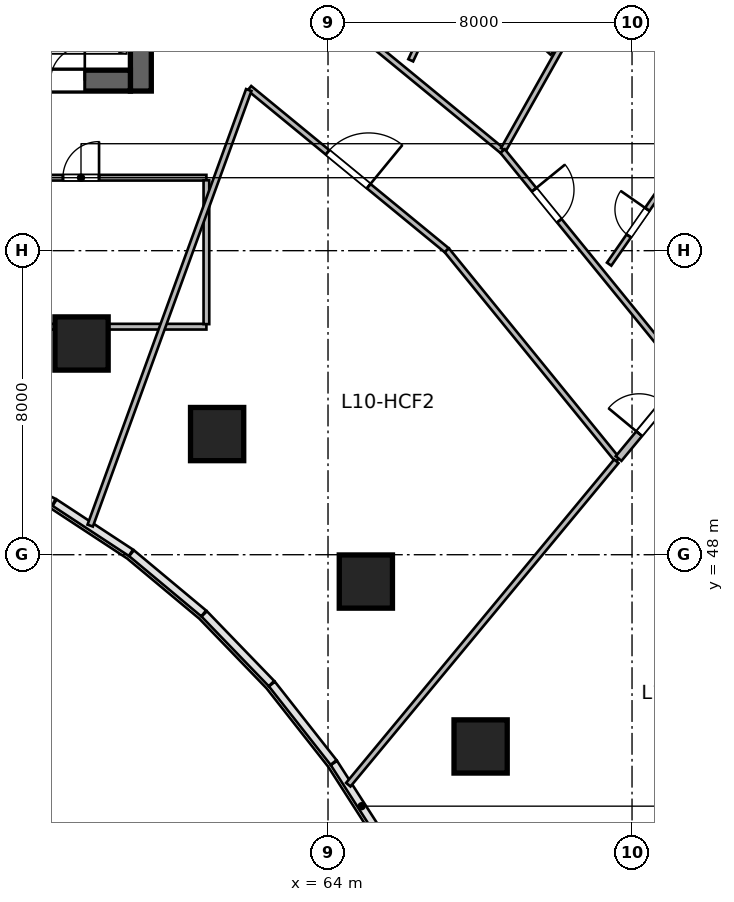
"""IFC4 building model, lengths in metres.
Left out: names, types, materials, properties, quantities, classifications, styles, units other than length and angle.
Written with IfcOpenShell. Run it as: python <this file> out.ifc"""

import sys

from ifc_helpers import new_model, si_unit, direction, frame, frame_2d, origin, origin_2d, place, context, subcontext, project, spatial, rectangle, circle, extrude, source, transform, mapped, element, fill, save


model = new_model("IFC4")
c1 = context("Model", 3, precision=1e-05, world=origin(), true_north=direction((0.0, 1.0)))
c2 = subcontext(c1, "Body", "Model", "MODEL_VIEW")
j1 = project(units=[si_unit("LENGTHUNIT", "METRE"), si_unit("PLANEANGLEUNIT", "RADIAN")], contexts=[c1])
p1 = place(None, origin())
s1 = spatial("IfcSite", under=j1, at=p1, CompositionType="ELEMENT")
p2 = place(p1, origin())
s2 = spatial("IfcBuilding", under=s1, at=p2, CompositionType="ELEMENT")
p3 = place(p2, frame((0.0, 0.0, 49.8)))
s3 = spatial("IfcBuildingStorey", under=s2, at=p3, CompositionType="ELEMENT", Elevation=49.8)
m1 = source(origin(), c2, "Body", "SweptSolid", [
    extrude(rectangle(XDim=12.0, YDim=0.55, at=frame_2d((6.0, 0.0))), origin(), (0.0, 0.0, 1.0), 3.6),
])
p4 = place(p3, frame((59.075, 60.2, 0.0), z_axis=(0.0, 0.0, 1.0), x_axis=(0.0, 1.0, 0.0)))
e1 = element("IfcWall", 1, at=p4, inside=s3, PredefinedType="SHEAR", context=c2, shape_type="MappedRepresentation", body=[
    mapped(m1, transform((0.0, 0.0, 0.0), scale=1.0)),
])
m2 = source(origin(), c2, "Body", "SweptSolid", [
    extrude(rectangle(XDim=21.6, YDim=0.55, at=frame_2d((10.8, 0.0))), origin(), (0.0, 0.0, 1.0), 3.6),
])
p5 = place(p3, frame((37.2, 60.475, 0.0), z_axis=(0.0, 0.0, 1.0), x_axis=(1.0, 0.0, 0.0)))
e2 = element("IfcWall", 2, at=p5, inside=s3, PredefinedType="SHEAR", context=c2, shape_type="MappedRepresentation", body=[
    mapped(m2, transform((0.0, 0.0, 0.0), scale=1.0)),
])
p6 = place(p5, frame((1.1, 0.0, 0.0)))
e3 = element("IfcOpeningElement", 3, at=p6, cuts=e2, PredefinedType="OPENING", context=c2, shape_type="SweptSolid", body=[
    extrude(rectangle(XDim=1.15, YDim=2.15, at=frame_2d((0.575, 1.075))), frame((0.0, 0.285, 0.0), z_axis=(0.0, -1.0, 0.0), x_axis=(1.0, 0.0, 0.0)), (0.0, 0.0, 1.0), 0.57),
])
p7 = place(p5, frame((19.5, 0.0, 0.0)))
e4 = element("IfcOpeningElement", 4, at=p7, cuts=e2, PredefinedType="OPENING", context=c2, shape_type="SweptSolid", body=[
    extrude(rectangle(XDim=0.9, YDim=2.1, at=frame_2d((0.45, 1.05))), frame((0.0, 0.285, 0.0), z_axis=(0.0, -1.0, 0.0), x_axis=(1.0, 0.0, 0.0)), (0.0, 0.0, 1.0), 0.57),
])
p8 = place(p5, frame((12.02, 0.0, 0.0)))
e5 = element("IfcOpeningElement", 5, at=p8, cuts=e2, PredefinedType="OPENING", context=c2, shape_type="SweptSolid", body=[
    extrude(rectangle(XDim=1.6, YDim=2.15, at=frame_2d((0.8, 1.075))), frame((0.0, 0.285, 0.0), z_axis=(0.0, -1.0, 0.0), x_axis=(1.0, 0.0, 0.0)), (0.0, 0.0, 1.0), 0.57),
])
m3 = source(origin(), c2, "Body", "SweptSolid", [
    extrude(circle(Radius=0.7, at=origin_2d()), origin(), (0.0, 0.0, 1.0), 3.6),
])
for number, where, z_axis, x_axis in (
    (6, (57.515, 53.558, 0.0), (0.0, 0.0, 1.0), (0.289, 0.957, 0.0)),
    (7, (61.082, 51.175, 0.0), (0.0, 0.0, 1.0), (0.409, 0.912, 0.0)),
    (8, (64.996, 47.294, 0.0), (0.0, 0.0, 1.0), (0.558, 0.83, 0.0)),
    (9, (68.015, 42.955, 0.0), (0.0, 0.0, 1.0), (0.691, 0.723, 0.0)),
):
    element("IfcColumn", number, at=place(p3, frame(where, z_axis=z_axis, x_axis=x_axis)), inside=s3, PredefinedType="COLUMN", context=c2, shape_type="MappedRepresentation", body=[
        mapped(m3, transform((0.0, 0.0, 0.0), scale=1.0)),
    ])
m4 = source(origin(), c2, "Body", "SweptSolid", [
    extrude(rectangle(XDim=6.6, YDim=0.15, at=frame_2d((3.3, 0.0))), origin(), (0.0, 0.0, 1.0), 2.803),
])
p9 = place(p3, frame((54.2, 54.0, 0.0), z_axis=(0.0, 0.0, 1.0), x_axis=(1.0, 0.0, 0.0)))
e10 = element("IfcWall", 10, at=p9, inside=s3, PredefinedType="PARTITIONING", context=c2, shape_type="MappedRepresentation", body=[
    mapped(m4, transform((0.0, 0.0, 0.0), scale=1.0)),
])
m5 = source(origin(), c2, "Body", "SweptSolid", [
    extrude(rectangle(XDim=6.6, YDim=0.15, at=frame_2d((3.3, 0.0))), origin(), (0.0, 0.0, 1.0), 3.36),
])
p10 = place(p3, frame((54.2, 57.92, 0.0), z_axis=(0.0, 0.0, 1.0), x_axis=(1.0, 0.0, 0.0)))
e11 = element("IfcWall", 11, at=p10, inside=s3, PredefinedType="PARTITIONING", context=c2, shape_type="MappedRepresentation", body=[
    mapped(m5, transform((0.0, 0.0, 0.0), scale=1.0)),
])
p11 = place(p10, frame((2.825, 0.0, 0.0)))
e12 = element("IfcOpeningElement", 12, at=p11, cuts=e11, PredefinedType="OPENING", context=c2, shape_type="SweptSolid", body=[
    extrude(rectangle(XDim=0.95, YDim=2.1, at=frame_2d((0.475, 1.05))), frame((0.0, 0.085, 0.0), z_axis=(0.0, -1.0, 0.0), x_axis=(1.0, 0.0, 0.0)), (0.0, 0.0, 1.0), 0.17),
])
m6 = source(origin(), c2, "Body", "SweptSolid", [
    extrude(rectangle(XDim=3.785, YDim=0.15, at=frame_2d((1.893, 0.0))), origin(), (0.0, 0.0, 1.0), 3.36),
])
p12 = place(p3, frame((60.8, 54.067, 0.0), z_axis=(0.0, 0.0, 1.0), x_axis=(0.0, 1.0, 0.0)))
e13 = element("IfcWall", 13, at=p12, inside=s3, PredefinedType="PARTITIONING", context=c2, shape_type="MappedRepresentation", body=[
    mapped(m6, transform((0.0, 0.0, 0.0), scale=1.0)),
])
m7 = source(origin(), c2, "Body", "SweptSolid", [
    extrude(rectangle(XDim=7.237, YDim=0.15, at=frame_2d((3.618, 0.0))), origin(), (0.0, 0.0, 1.0), 3.36),
])
p13 = place(p3, frame((63.001, 63.214, 0.0), z_axis=(0.0, 0.0, 1.0), x_axis=(0.772813707793, -0.634632943557, 0.0)))
e14 = element("IfcWall", 14, at=p13, inside=s3, PredefinedType="PARTITIONING", context=c2, shape_type="MappedRepresentation", body=[
    mapped(m7, transform((0.0, 0.0, 0.0), scale=1.0)),
])
p14 = place(p13, frame((1.212, 0.0, 0.0)))
e15 = element("IfcOpeningElement", 15, at=p14, cuts=e14, PredefinedType="OPENING", context=c2, shape_type="SweptSolid", body=[
    extrude(rectangle(XDim=1.05, YDim=2.15, at=frame_2d((0.525, 1.075))), frame((0.0, 0.085, 0.0), z_axis=(0.0, -1.0, 0.0), x_axis=(1.0, 0.0, 0.0)), (0.0, 0.0, 1.0), 0.17),
])
m8 = source(origin(), c2, "Body", "SweptSolid", [
    extrude(rectangle(XDim=11.573, YDim=0.15, at=frame_2d((5.786, 0.0))), origin(), (0.0, 0.0, 1.0), 3.36),
])
p15 = place(p3, frame((68.618, 58.664, 0.0), z_axis=(0.0, 0.0, 1.0), x_axis=(0.490161073951, 0.871631872744, 0.0)))
e16 = element("IfcWall", 16, at=p15, inside=s3, PredefinedType="PARTITIONING", context=c2, shape_type="MappedRepresentation", body=[
    mapped(m8, transform((0.0, 0.0, 0.0), scale=1.0)),
])
m9 = source(origin(), c2, "Body", "SweptSolid", [
    extrude(rectangle(XDim=3.456, YDim=0.14, at=frame_2d((1.728, 0.0))), origin(), (0.0, 0.0, 1.0), 3.36),
])
p16 = place(p3, frame((67.358, 63.544, 0.0), z_axis=(0.0, 0.0, 1.0), x_axis=(0.736860870293, -0.676044420013, 0.0)))
e17 = element("IfcWall", 17, at=p16, inside=s3, PredefinedType="PARTITIONING", context=c2, shape_type="MappedRepresentation", body=[
    mapped(m9, transform((0.0, 0.0, 0.0), scale=1.0)),
])
m10 = source(origin(), c2, "Body", "SweptSolid", [
    extrude(rectangle(XDim=2.796, YDim=0.14, at=frame_2d((1.398, 0.0))), origin(), (0.0, 0.0, 1.0), 3.36),
])
p17 = place(p3, frame((66.177, 61.009, 0.0), z_axis=(0.0, 0.0, 1.0), x_axis=(0.422316594955, 0.906448395456, 0.0)))
e18 = element("IfcWall", 18, at=p17, inside=s3, PredefinedType="PARTITIONING", context=c2, shape_type="MappedRepresentation", body=[
    mapped(m10, transform((0.0, 0.0, 0.0), scale=1.0)),
])
p18 = place(p17, frame((0.973, 0.0, 0.0)))
e19 = element("IfcOpeningElement", 19, at=p18, cuts=e18, PredefinedType="OPENING", context=c2, shape_type="SweptSolid", body=[
    extrude(rectangle(XDim=0.85, YDim=2.05, at=frame_2d((0.425, 1.025))), frame((0.0, 0.08, 0.0), z_axis=(0.0, -1.0, 0.0), x_axis=(1.0, 0.0, 0.0)), (0.0, 0.0, 1.0), 0.16),
])
m11 = source(origin(), c2, "Body", "SweptSolid", [
    extrude(rectangle(XDim=7.659, YDim=0.15, at=frame_2d((3.829, 0.0))), origin(), (0.0, 0.0, 1.0), 3.36),
])
p19 = place(p3, frame((68.594, 58.621, 0.0), z_axis=(0.0, 0.0, 1.0), x_axis=(0.631489868862, -0.775384127723, 0.0)))
e20 = element("IfcWall", 20, at=p19, inside=s3, PredefinedType="PARTITIONING", context=c2, shape_type="MappedRepresentation", body=[
    mapped(m11, transform((0.0, 0.0, 0.0), scale=1.0)),
])
p20 = place(p19, frame((1.313, 0.0, 0.0)))
e21 = element("IfcOpeningElement", 21, at=p20, cuts=e20, PredefinedType="OPENING", context=c2, shape_type="SweptSolid", body=[
    extrude(rectangle(XDim=1.05, YDim=2.15, at=frame_2d((0.525, 1.075))), frame((0.0, 0.085, 0.0), z_axis=(0.0, -1.0, 0.0), x_axis=(1.0, 0.0, 0.0)), (0.0, 0.0, 1.0), 0.17),
])
m12 = source(origin(), c2, "Body", "SweptSolid", [
    extrude(rectangle(XDim=2.663, YDim=0.14, at=frame_2d((1.332, 0.0))), origin(), (0.0, 0.0, 1.0), 3.36),
])
p21 = place(p3, frame((71.397, 55.645, 0.0), z_axis=(0.0, 0.0, 1.0), x_axis=(0.570905989724, 0.821015438891, 0.0)))
e22 = element("IfcWall", 22, at=p21, inside=s3, PredefinedType="PARTITIONING", context=c2, shape_type="MappedRepresentation", body=[
    mapped(m12, transform((0.0, 0.0, 0.0), scale=1.0)),
])
p22 = place(p21, frame((0.906, 0.0, 0.0)))
e23 = element("IfcOpeningElement", 23, at=p22, cuts=e22, PredefinedType="OPENING", context=c2, shape_type="SweptSolid", body=[
    extrude(rectangle(XDim=0.85, YDim=2.05, at=frame_2d((0.425, 1.025))), frame((0.0, 0.08, 0.0), z_axis=(0.0, -1.0, 0.0), x_axis=(1.0, 0.0, 0.0)), (0.0, 0.0, 1.0), 0.16),
])
m13 = source(origin(), c2, "Body", "SweptSolid", [
    extrude(rectangle(XDim=6.721, YDim=0.15, at=frame_2d((3.361, 0.0))), origin(), (0.0, 0.0, 1.0), 3.36),
])
p23 = place(p3, frame((61.931, 60.275, 0.0), z_axis=(0.0, 0.0, 1.0), x_axis=(0.772828051199, -0.63461547671, 0.0)))
e24 = element("IfcWall", 24, at=p23, inside=s3, PredefinedType="PARTITIONING", context=c2, shape_type="MappedRepresentation", body=[
    mapped(m13, transform((0.0, 0.0, 0.0), scale=1.0)),
])
p24 = place(p23, frame((2.66, 0.0, 0.0)))
e25 = element("IfcOpeningElement", 25, at=p24, cuts=e24, PredefinedType="OPENING", context=c2, shape_type="SweptSolid", body=[
    extrude(rectangle(XDim=1.4, YDim=2.15, at=frame_2d((0.7, 1.075))), frame((0.0, 0.085, 0.0), z_axis=(0.0, -1.0, 0.0), x_axis=(1.0, 0.0, 0.0)), (0.0, 0.0, 1.0), 0.17),
])
m14 = source(origin(), c2, "Body", "SweptSolid", [
    extrude(rectangle(XDim=7.113, YDim=0.15, at=frame_2d((3.556, 0.0))), origin(), (0.0, 0.0, 1.0), 3.36),
])
p25 = place(p3, frame((67.126, 56.01, 0.0), z_axis=(0.0, 0.0, 1.0), x_axis=(0.63149032532, -0.775383755974, 0.0)))
e26 = element("IfcWall", 26, at=p25, inside=s3, PredefinedType="PARTITIONING", context=c2, shape_type="MappedRepresentation", body=[
    mapped(m14, transform((0.0, 0.0, 0.0), scale=1.0)),
])
m15 = source(origin(), c2, "Body", "SweptSolid", [
    extrude(rectangle(XDim=12.196, YDim=0.15, at=frame_2d((6.098, 0.0))), origin(), (0.0, 0.0, 1.0), 3.36),
])
p26 = place(p3, frame((57.742, 48.766, 0.0), z_axis=(0.0, 0.0, 1.0), x_axis=(0.342022711534, 0.939691686031, 0.0)))
e27 = element("IfcWall", 27, at=p26, inside=s3, PredefinedType="PARTITIONING", context=c2, shape_type="MappedRepresentation", body=[
    mapped(m15, transform((0.0, 0.0, 0.0), scale=1.0)),
])
m16 = source(origin(), c2, "Body", "SweptSolid", [
    extrude(rectangle(XDim=11.053, YDim=0.15, at=frame_2d((5.527, 0.0))), origin(), (0.0, 0.0, 1.0), 3.36),
])
p27 = place(p3, frame((64.534, 41.949, 0.0), z_axis=(0.0, 0.0, 1.0), x_axis=(0.638131235571, 0.769927611005, 0.0)))
e28 = element("IfcWall", 28, at=p27, inside=s3, PredefinedType="PARTITIONING", context=c2, shape_type="MappedRepresentation", body=[
    mapped(m16, transform((0.0, 0.0, 0.0), scale=1.0)),
])
m17 = source(origin(), c2, "Body", "SweptSolid", [
    extrude(rectangle(XDim=2.748, YDim=0.195, at=frame_2d((1.374, 0.0))), origin(), (0.0, 0.0, 1.0), 3.36),
])
p28 = place(p3, frame((71.647, 50.531, 0.0), z_axis=(0.0, 0.0, 1.0), x_axis=(0.638111168284, 0.769944242729, 0.0)))
e29 = element("IfcWall", 29, at=p28, inside=s3, PredefinedType="PARTITIONING", context=c2, shape_type="MappedRepresentation", body=[
    mapped(m17, transform((0.0, 0.0, 0.0), scale=1.0)),
])
p29 = place(p28, frame((0.849, 0.0, 0.0)))
e30 = element("IfcOpeningElement", 30, at=p29, cuts=e29, PredefinedType="OPENING", context=c2, shape_type="SweptSolid", body=[
    extrude(rectangle(XDim=1.05, YDim=2.15, at=frame_2d((0.525, 1.075))), frame((0.0, 0.107, 0.0), z_axis=(0.0, -1.0, 0.0), x_axis=(1.0, 0.0, 0.0)), (0.0, 0.0, 1.0), 0.215),
])
m18 = source(origin(), c2, "Body", "SweptSolid", [
    extrude(rectangle(XDim=0.9, YDim=2.1, at=frame_2d((0.45, 1.05))), frame((0.0, 0.025, 0.0), z_axis=(0.0, -1.0, 0.0), x_axis=(1.0, 0.0, 0.0)), (0.0, 0.0, 1.0), 0.05),
])
p30 = place(p7, origin())
e31 = element("IfcDoor", 31, at=p30, inside=s3, OperationType="SINGLE_SWING_RIGHT", PredefinedType="DOOR", context=c2, shape_type="MappedRepresentation", body=[
    mapped(m18, transform((0.0, 0.0, 0.0), scale=1.0)),
])
fill(e4, e31)
m19 = source(origin(), c2, "Body", "SweptSolid", [
    extrude(rectangle(XDim=0.95, YDim=2.1, at=frame_2d((0.475, 1.05))), frame((0.0, 0.025, 0.0), z_axis=(0.0, -1.0, 0.0), x_axis=(1.0, 0.0, 0.0)), (0.0, 0.0, 1.0), 0.05),
])
p31 = place(p11, origin())
e32 = element("IfcDoor", 32, at=p31, inside=s3, OperationType="SINGLE_SWING_RIGHT", PredefinedType="DOOR", context=c2, shape_type="MappedRepresentation", body=[
    mapped(m19, transform((0.0, 0.0, 0.0), scale=1.0)),
])
fill(e12, e32)
m20 = source(origin(), c2, "Body", "SweptSolid", [
    extrude(rectangle(XDim=1.05, YDim=2.15, at=frame_2d((0.525, 1.075))), frame((0.0, 0.025, 0.0), z_axis=(0.0, -1.0, 0.0), x_axis=(1.0, 0.0, 0.0)), (0.0, 0.0, 1.0), 0.05),
])
p32 = place(p20, origin())
e33 = element("IfcDoor", 33, at=p32, inside=s3, OperationType="SINGLE_SWING_LEFT", PredefinedType="DOOR", context=c2, shape_type="MappedRepresentation", body=[
    mapped(m20, transform((0.0, 0.0, 0.0), scale=1.0)),
])
fill(e21, e33)
m21 = source(origin(), c2, "Body", "SweptSolid", [
    extrude(rectangle(XDim=0.85, YDim=2.05, at=frame_2d((0.425, 1.025))), frame((0.0, 0.025, 0.0), z_axis=(0.0, -1.0, 0.0), x_axis=(1.0, 0.0, 0.0)), (0.0, 0.0, 1.0), 0.05),
])
p33 = place(p22, origin())
e34 = element("IfcDoor", 34, at=p33, inside=s3, OperationType="SINGLE_SWING_RIGHT", PredefinedType="DOOR", context=c2, shape_type="MappedRepresentation", body=[
    mapped(m21, transform((0.0, 0.0, 0.0), scale=1.0)),
])
fill(e23, e34)
m22 = source(origin(), c2, "Body", "SweptSolid", [
    extrude(rectangle(XDim=1.4, YDim=2.15, at=frame_2d((0.7, 1.075))), frame((0.0, 0.025, 0.0), z_axis=(0.0, -1.0, 0.0), x_axis=(1.0, 0.0, 0.0)), (0.0, 0.0, 1.0), 0.05),
])
p34 = place(p24, origin())
e35 = element("IfcDoor", 35, at=p34, inside=s3, OperationType="SINGLE_SWING_RIGHT", PredefinedType="DOOR", context=c2, shape_type="MappedRepresentation", body=[
    mapped(m22, transform((0.0, 0.0, 0.0), scale=1.0)),
])
fill(e25, e35)
p35 = place(p29, origin())
e36 = element("IfcDoor", 36, at=p35, inside=s3, OperationType="SINGLE_SWING_LEFT", PredefinedType="DOOR", context=c2, shape_type="MappedRepresentation", body=[
    mapped(m20, transform((0.0, 0.0, 0.0), scale=1.0)),
])
fill(e30, e36)
save(model, sys.argv[1])
